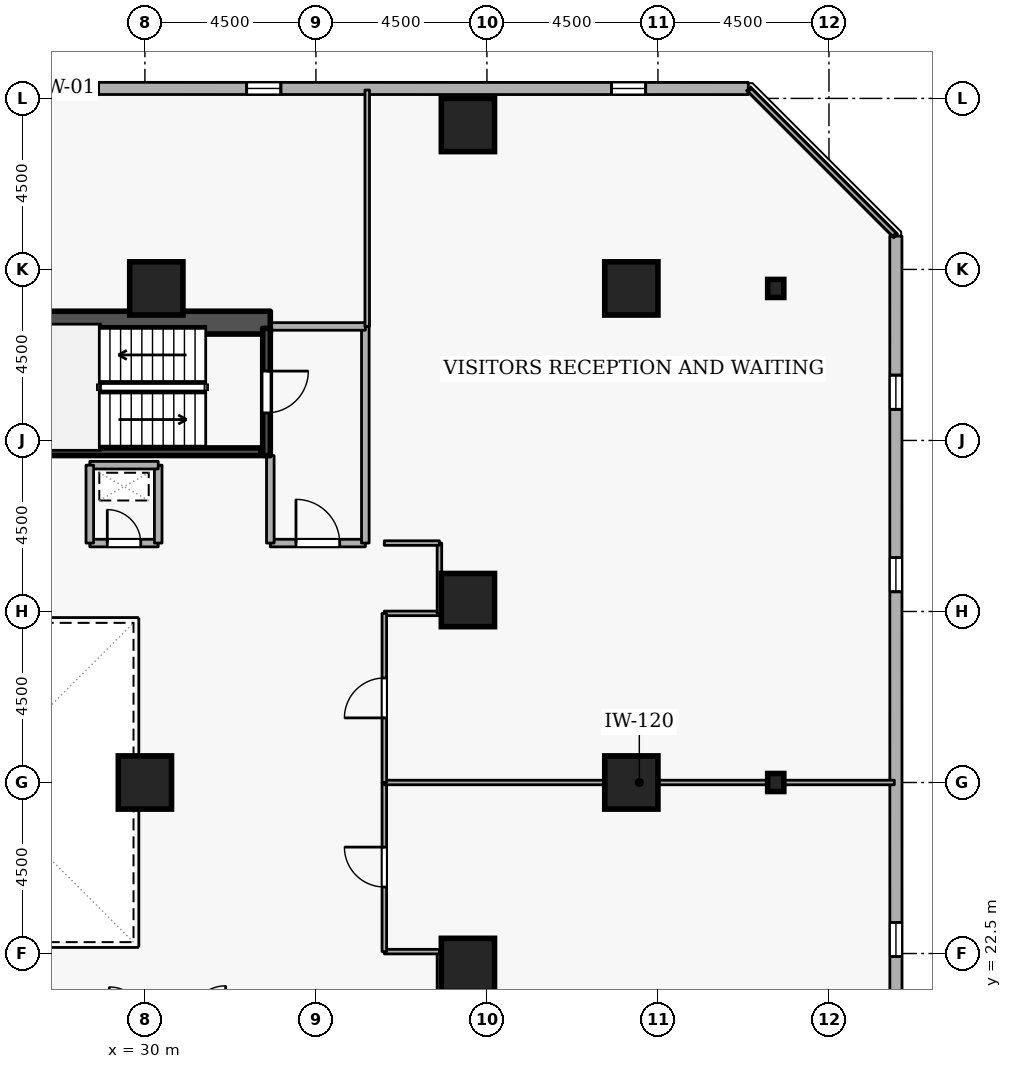
"""IFC4 building model, lengths in metres.
Left out: names, types, materials, properties, quantities, classifications, styles, units other than length and angle.
Written with IfcOpenShell. Run it as: python <this file> out.ifc"""

import sys

from ifc_helpers import new_model, si_unit, direction, frame, frame_2d, origin, origin_2d, place, context, subcontext, project, spatial, rectangle, i_section, extrude, element, fill, save


model = new_model("IFC4")
c1 = context("Model", 3, precision=1e-05, world=origin(), true_north=direction((0.0, 1.0)))
c2 = subcontext(c1, "Body", "Model", "MODEL_VIEW")
j1 = project(units=[si_unit("LENGTHUNIT", "METRE"), si_unit("PLANEANGLEUNIT", "RADIAN")], contexts=[c1])
p1 = place(None, origin())
s1 = spatial("IfcSite", under=j1, at=p1, CompositionType="ELEMENT")
p2 = place(p1, origin())
s2 = spatial("IfcBuilding", under=s1, at=p2, CompositionType="ELEMENT")
p3 = place(p2, frame((0.0, 0.0, 53.7)))
s3 = spatial("IfcBuildingStorey", under=s2, at=p3, CompositionType="ELEMENT", Elevation=53.7)
p4 = place(p3, frame((17.7, 39.1, 0.0), z_axis=(0.0, 0.0, 1.0), x_axis=(1.0, 0.0, 0.0)))
e1 = element("IfcWall", 1, at=p4, inside=s3, PredefinedType="SHEAR", context=c2, shape_type="SweptSolid", body=[
    extrude(rectangle(XDim=15.6, YDim=0.6, at=frame_2d((7.8, 0.0))), origin(), (0.0, 0.0, 1.0), 3.6),
])
for number, where, z_axis, x_axis in (
    (2, (42.8, 27.0, 0.0), (0.0, 0.0, 1.0), (1.0, 0.0, 0.0)),
    (3, (42.8, 40.0, 0.0), (0.0, 0.0, 1.0), (1.0, 0.0, 0.0)),
    (4, (38.5, 44.3, 0.0), (0.0, 0.0, 1.0), (1.0, 0.0, 0.0)),
    (5, (38.5, 22.2, 0.0), (0.0, 0.0, 1.0), (1.0, 0.0, 0.0)),
    (6, (38.5, 31.8, 0.0), (0.0, 0.0, 1.0), (1.0, 0.0, 0.0)),
    (7, (30.3, 40.0, 0.0), (0.0, 0.0, 1.0), (1.0, 0.0, 0.0)),
    (8, (30.0, 27.0, 0.0), (0.0, 0.0, 1.0), (1.0, 0.0, 0.0)),
):
    element("IfcColumn", number, at=place(p3, frame(where, z_axis=z_axis, x_axis=x_axis)), inside=s3, PredefinedType="COLUMN", context=c2, shape_type="SweptSolid", body=[
        extrude(rectangle(XDim=1.4, YDim=1.4, at=origin_2d()), origin(), (0.0, 0.0, 1.0), 3.6),
    ])
for number, where, z_axis, x_axis in (
    (9, (46.6, 27.0, 0.0), (0.0, 0.0, 1.0), (1.0, 0.0, 0.0)),
    (10, (46.6, 40.0, 0.0), (0.0, 0.0, 1.0), (1.0, 0.0, 0.0)),
):
    element("IfcColumn", number, at=place(p3, frame(where, z_axis=z_axis, x_axis=x_axis)), inside=s3, PredefinedType="COLUMN", context=c2, shape_type="SweptSolid", body=[
        extrude(i_section(OverallWidth=0.424, OverallDepth=0.475, WebThickness=0.048, FlangeThickness=0.077, FilletRadius=0.015, at=origin_2d()), origin(), (0.0, 0.0, 1.0), 3.6),
    ])
p5 = place(p3, frame((49.765, 5.319, 0.0), z_axis=(0.0, 0.0, 1.0), x_axis=(-0.000121872777, 0.999999992574, 0.0)))
e11 = element("IfcWall", 11, at=p5, inside=s3, PredefinedType="STANDARD", context=c2, shape_type="SweptSolid", body=[
    extrude(rectangle(XDim=36.058, YDim=0.32, at=frame_2d((18.029, 0.0))), origin(), (0.0, 0.0, 1.0), 2.7),
])
p6 = place(p5, frame((2.7, 0.0, 0.72)))
e12 = element("IfcOpeningElement", 12, at=p6, cuts=e11, PredefinedType="OPENING", context=c2, shape_type="SweptSolid", body=[
    extrude(rectangle(XDim=0.9, YDim=1.75, at=frame_2d((0.45, 0.875))), frame((0.0, 0.17, 0.0), z_axis=(0.0, -1.0, 0.0), x_axis=(1.0, 0.0, 0.0)), (0.0, 0.0, 1.0), 0.34),
])
p7 = place(p5, frame((12.3, 0.0, 0.72)))
e13 = element("IfcOpeningElement", 13, at=p7, cuts=e11, PredefinedType="OPENING", context=c2, shape_type="SweptSolid", body=[
    extrude(rectangle(XDim=0.9, YDim=1.75, at=frame_2d((0.45, 0.875))), frame((0.0, 0.17, 0.0), z_axis=(0.0, -1.0, 0.0), x_axis=(1.0, 0.0, 0.0)), (0.0, 0.0, 1.0), 0.34),
])
p8 = place(p5, frame((17.1, 0.0, 0.72)))
e14 = element("IfcOpeningElement", 14, at=p8, cuts=e11, PredefinedType="OPENING", context=c2, shape_type="SweptSolid", body=[
    extrude(rectangle(XDim=0.9, YDim=1.75, at=frame_2d((0.45, 0.875))), frame((0.0, 0.17, 0.0), z_axis=(0.0, -1.0, 0.0), x_axis=(1.0, 0.0, 0.0)), (0.0, 0.0, 1.0), 0.34),
])
p9 = place(p5, frame((26.7, 0.0, 0.72)))
e15 = element("IfcOpeningElement", 15, at=p9, cuts=e11, PredefinedType="OPENING", context=c2, shape_type="SweptSolid", body=[
    extrude(rectangle(XDim=0.9, YDim=1.75, at=frame_2d((0.45, 0.875))), frame((0.0, 0.17, 0.0), z_axis=(0.0, -1.0, 0.0), x_axis=(1.0, 0.0, 0.0)), (0.0, 0.0, 1.0), 0.34),
])
p10 = place(p5, frame((31.5, 0.0, 0.72)))
e16 = element("IfcOpeningElement", 16, at=p10, cuts=e11, PredefinedType="OPENING", context=c2, shape_type="SweptSolid", body=[
    extrude(rectangle(XDim=0.9, YDim=1.75, at=frame_2d((0.45, 0.875))), frame((0.0, 0.17, 0.0), z_axis=(0.0, -1.0, 0.0), x_axis=(1.0, 0.0, 0.0)), (0.0, 0.0, 1.0), 0.34),
])
p11 = place(p3, frame((45.877, 45.26, 0.0), z_axis=(0.0, 0.0, 1.0), x_axis=(-0.999999992574, 0.000121872777, 0.0)))
e17 = element("IfcWall", 17, at=p11, inside=s3, PredefinedType="STANDARD", context=c2, shape_type="SweptSolid", body=[
    extrude(rectangle(XDim=36.058, YDim=0.32, at=frame_2d((18.029, 0.0))), origin(), (0.0, 0.0, 1.0), 2.7),
])
p12 = place(p11, frame((2.7, 0.0, 0.72)))
e18 = element("IfcOpeningElement", 18, at=p12, cuts=e17, PredefinedType="OPENING", context=c2, shape_type="SweptSolid", body=[
    extrude(rectangle(XDim=0.9, YDim=1.75, at=frame_2d((0.45, 0.875))), frame((0.0, 0.17, 0.0), z_axis=(0.0, -1.0, 0.0), x_axis=(1.0, 0.0, 0.0)), (0.0, 0.0, 1.0), 0.34),
])
p13 = place(p11, frame((12.3, 0.0, 0.72)))
e19 = element("IfcOpeningElement", 19, at=p13, cuts=e17, PredefinedType="OPENING", context=c2, shape_type="SweptSolid", body=[
    extrude(rectangle(XDim=0.9, YDim=1.75, at=frame_2d((0.45, 0.875))), frame((0.0, 0.17, 0.0), z_axis=(0.0, -1.0, 0.0), x_axis=(1.0, 0.0, 0.0)), (0.0, 0.0, 1.0), 0.34),
])
p14 = place(p11, frame((17.1, 0.0, 0.72)))
e20 = element("IfcOpeningElement", 20, at=p14, cuts=e17, PredefinedType="OPENING", context=c2, shape_type="SweptSolid", body=[
    extrude(rectangle(XDim=0.9, YDim=1.75, at=frame_2d((0.45, 0.875))), frame((0.0, 0.17, 0.0), z_axis=(0.0, -1.0, 0.0), x_axis=(1.0, 0.0, 0.0)), (0.0, 0.0, 1.0), 0.34),
])
p15 = place(p11, frame((21.9, 0.0, 0.72)))
e21 = element("IfcOpeningElement", 21, at=p15, cuts=e17, PredefinedType="OPENING", context=c2, shape_type="SweptSolid", body=[
    extrude(rectangle(XDim=0.9, YDim=1.75, at=frame_2d((0.45, 0.875))), frame((0.0, 0.17, 0.0), z_axis=(0.0, -1.0, 0.0), x_axis=(1.0, 0.0, 0.0)), (0.0, 0.0, 1.0), 0.34),
])
p16 = place(p11, frame((26.7, 0.0, 0.72)))
e22 = element("IfcOpeningElement", 22, at=p16, cuts=e17, PredefinedType="OPENING", context=c2, shape_type="SweptSolid", body=[
    extrude(rectangle(XDim=0.9, YDim=1.75, at=frame_2d((0.45, 0.875))), frame((0.0, 0.17, 0.0), z_axis=(0.0, -1.0, 0.0), x_axis=(1.0, 0.0, 0.0)), (0.0, 0.0, 1.0), 0.34),
])
p17 = place(p3, frame((33.2, 38.95, 0.0), z_axis=(0.0, 0.0, 1.0), x_axis=(0.0, -1.0, 0.0)))
e23 = element("IfcWall", 23, at=p17, inside=s3, PredefinedType="SHEAR", context=c2, shape_type="SweptSolid", body=[
    extrude(rectangle(XDim=3.35, YDim=0.2, at=frame_2d((1.675, 0.0))), origin(), (0.0, 0.0, 1.0), 3.6),
])
p18 = place(p17, frame((1.125, 0.0, 0.0)))
e24 = element("IfcOpeningElement", 24, at=p18, cuts=e23, PredefinedType="OPENING", context=c2, shape_type="SweptSolid", body=[
    extrude(rectangle(XDim=1.1, YDim=2.1, at=frame_2d((0.55, 1.05))), frame((0.0, 0.11, 0.0), z_axis=(0.0, -1.0, 0.0), x_axis=(1.0, 0.0, 0.0)), (0.0, 0.0, 1.0), 0.22),
])
p19 = place(p3, frame((25.95, 35.703, 0.0), z_axis=(0.0, 0.0, 1.0), x_axis=(1.0, 0.0, 0.0)))
e25 = element("IfcWall", 25, at=p19, inside=s3, PredefinedType="SHEAR", context=c2, shape_type="SweptSolid", body=[
    extrude(rectangle(XDim=7.1, YDim=0.2, at=frame_2d((3.55, 0.0))), origin(), (0.0, 0.0, 1.0), 3.6),
])
p20 = place(p3, frame((33.3, 33.3, 0.0), z_axis=(0.0, 0.0, 1.0), x_axis=(1.0, 0.0, 0.0)))
e26 = element("IfcWall", 26, at=p20, inside=s3, PredefinedType="STANDARD", context=c2, shape_type="SweptSolid", body=[
    extrude(rectangle(XDim=2.5, YDim=0.2, at=frame_2d((1.25, 0.0))), origin(), (0.0, 0.0, 1.0), 3.34),
])
p21 = place(p20, frame((0.675, 0.0, 0.0)))
e27 = element("IfcOpeningElement", 27, at=p21, cuts=e26, PredefinedType="OPENING", context=c2, shape_type="SweptSolid", body=[
    extrude(rectangle(XDim=1.15, YDim=2.1, at=frame_2d((0.575, 1.05))), frame((0.0, 0.11, 0.0), z_axis=(0.0, -1.0, 0.0), x_axis=(1.0, 0.0, 0.0)), (0.0, 0.0, 1.0), 0.22),
])
p22 = place(p3, frame((35.8, 33.3, 0.0), z_axis=(0.0, 0.0, 1.0), x_axis=(0.0, 1.0, 0.0)))
e28 = element("IfcWall", 28, at=p22, inside=s3, PredefinedType="STANDARD", context=c2, shape_type="SweptSolid", body=[
    extrude(rectangle(XDim=5.7, YDim=0.2, at=frame_2d((2.85, 0.0))), origin(), (0.0, 0.0, 1.0), 3.34),
])
p23 = place(p3, frame((35.8, 39.0, 0.0), z_axis=(0.0, 0.0, 1.0), x_axis=(-1.0, 0.0, 0.0)))
e29 = element("IfcWall", 29, at=p23, inside=s3, PredefinedType="STANDARD", context=c2, shape_type="SweptSolid", body=[
    extrude(rectangle(XDim=2.5, YDim=0.2, at=frame_2d((1.25, 0.0))), origin(), (0.0, 0.0, 1.0), 3.34),
])
p24 = place(p3, frame((33.3, 35.6, 0.0), z_axis=(0.0, 0.0, 1.0), x_axis=(0.0, -1.0, 0.0)))
e30 = element("IfcWall", 30, at=p24, inside=s3, PredefinedType="STANDARD", context=c2, shape_type="SweptSolid", body=[
    extrude(rectangle(XDim=2.3, YDim=0.2, at=frame_2d((1.15, 0.0))), origin(), (0.0, 0.0, 1.0), 2.545),
])
p25 = place(p3, frame((28.55, 33.3, 0.0), z_axis=(0.0, 0.0, 1.0), x_axis=(1.0, 0.0, 0.0)))
e31 = element("IfcWall", 31, at=p25, inside=s3, PredefinedType="STANDARD", context=c2, shape_type="SweptSolid", body=[
    extrude(rectangle(XDim=1.8, YDim=0.2, at=frame_2d((0.9, 0.0))), origin(), (0.0, 0.0, 1.0), 3.34),
])
p26 = place(p25, frame((0.46, 0.0, 0.0)))
e32 = element("IfcOpeningElement", 32, at=p26, cuts=e31, PredefinedType="OPENING", context=c2, shape_type="SweptSolid", body=[
    extrude(rectangle(XDim=0.88, YDim=2.04, at=frame_2d((0.44, 1.02))), frame((0.0, 0.11, 0.0), z_axis=(0.0, -1.0, 0.0), x_axis=(1.0, 0.0, 0.0)), (0.0, 0.0, 1.0), 0.22),
])
p27 = place(p3, frame((30.35, 33.3, 0.0), z_axis=(0.0, 0.0, 1.0), x_axis=(0.0, 1.0, 0.0)))
e33 = element("IfcWall", 33, at=p27, inside=s3, PredefinedType="STANDARD", context=c2, shape_type="SweptSolid", body=[
    extrude(rectangle(XDim=2.05, YDim=0.2, at=frame_2d((1.025, 0.0))), origin(), (0.0, 0.0, 1.0), 3.34),
])
p28 = place(p3, frame((30.35, 35.35, 0.0), z_axis=(0.0, 0.0, 1.0), x_axis=(-1.0, 0.0, 0.0)))
e34 = element("IfcWall", 34, at=p28, inside=s3, PredefinedType="STANDARD", context=c2, shape_type="SweptSolid", body=[
    extrude(rectangle(XDim=1.8, YDim=0.2, at=frame_2d((0.9, 0.0))), origin(), (0.0, 0.0, 1.0), 3.34),
])
p29 = place(p3, frame((28.55, 35.35, 0.0), z_axis=(0.0, 0.0, 1.0), x_axis=(0.0, -1.0, 0.0)))
e35 = element("IfcWall", 35, at=p29, inside=s3, PredefinedType="STANDARD", context=c2, shape_type="SweptSolid", body=[
    extrude(rectangle(XDim=2.05, YDim=0.2, at=frame_2d((1.025, 0.0))), origin(), (0.0, 0.0, 1.0), 3.34),
])
p30 = place(p3, frame((37.75, 20.7, 0.0), z_axis=(0.0, 0.0, 1.0), x_axis=(0.0, 1.0, 0.0)))
e36 = element("IfcWall", 36, at=p30, inside=s3, PredefinedType="PARTITIONING", context=c2, shape_type="SweptSolid", body=[
    extrude(rectangle(XDim=1.85, YDim=0.12, at=frame_2d((0.925, 0.0))), origin(), (0.0, 0.0, 1.0), 3.34),
])
p31 = place(p3, frame((37.75, 22.55, 0.0), z_axis=(0.0, 0.0, 1.0), x_axis=(-1.0, 0.0, 0.0)))
e37 = element("IfcWall", 37, at=p31, inside=s3, PredefinedType="PARTITIONING", context=c2, shape_type="SweptSolid", body=[
    extrude(rectangle(XDim=1.45, YDim=0.12, at=frame_2d((0.725, 0.0))), origin(), (0.0, 0.0, 1.0), 3.34),
])
p32 = place(p3, frame((36.3, 22.55, 0.0), z_axis=(0.0, 0.0, 1.0), x_axis=(0.0, 1.0, 0.0)))
e38 = element("IfcWall", 38, at=p32, inside=s3, PredefinedType="PARTITIONING", context=c2, shape_type="SweptSolid", body=[
    extrude(rectangle(XDim=4.45, YDim=0.12, at=frame_2d((2.225, 0.0))), origin(), (0.0, 0.0, 1.0), 3.34),
])
p33 = place(p32, frame((1.7, 0.0, 0.0)))
e39 = element("IfcOpeningElement", 39, at=p33, cuts=e38, PredefinedType="OPENING", context=c2, shape_type="SweptSolid", body=[
    extrude(rectangle(XDim=1.05, YDim=2.1, at=frame_2d((0.525, 1.05))), frame((0.0, 0.07, 0.0), z_axis=(0.0, -1.0, 0.0), x_axis=(1.0, 0.0, 0.0)), (0.0, 0.0, 1.0), 0.14),
])
p34 = place(p3, frame((36.3, 27.0, 0.0), z_axis=(0.0, 0.0, 1.0), x_axis=(1.0, 0.0, 0.0)))
e40 = element("IfcWall", 40, at=p34, inside=s3, PredefinedType="PARTITIONING", context=c2, shape_type="SweptSolid", body=[
    extrude(rectangle(XDim=13.42, YDim=0.12, at=frame_2d((6.71, 0.0))), origin(), (0.0, 0.0, 1.0), 2.932),
])
p35 = place(p3, frame((36.3, 31.45, 0.0), z_axis=(0.0, 0.0, 1.0), x_axis=(1.0, 0.0, 0.0)))
e41 = element("IfcWall", 41, at=p35, inside=s3, PredefinedType="PARTITIONING", context=c2, shape_type="SweptSolid", body=[
    extrude(rectangle(XDim=1.45, YDim=0.12, at=frame_2d((0.725, 0.0))), origin(), (0.0, 0.0, 1.0), 3.34),
])
p36 = place(p3, frame((37.75, 31.45, 0.0), z_axis=(0.0, 0.0, 1.0), x_axis=(0.0, 1.0, 0.0)))
e42 = element("IfcWall", 42, at=p36, inside=s3, PredefinedType="PARTITIONING", context=c2, shape_type="SweptSolid", body=[
    extrude(rectangle(XDim=1.85, YDim=0.12, at=frame_2d((0.925, 0.0))), origin(), (0.0, 0.0, 1.0), 3.34),
])
p37 = place(p3, frame((37.75, 33.3, 0.0), z_axis=(0.0, 0.0, 1.0), x_axis=(-1.0, 0.0, 0.0)))
e43 = element("IfcWall", 43, at=p37, inside=s3, PredefinedType="PARTITIONING", context=c2, shape_type="SweptSolid", body=[
    extrude(rectangle(XDim=1.45, YDim=0.12, at=frame_2d((0.725, 0.0))), origin(), (0.0, 0.0, 1.0), 3.34),
])
p38 = place(p3, frame((35.85, 39.0, 0.0), z_axis=(0.0, 0.0, 1.0), x_axis=(0.0, 1.0, 0.0)))
e44 = element("IfcWall", 44, at=p38, inside=s3, PredefinedType="PARTITIONING", context=c2, shape_type="SweptSolid", body=[
    extrude(rectangle(XDim=6.22, YDim=0.12, at=frame_2d((3.11, 0.0))), origin(), (0.0, 0.0, 1.0), 3.34),
])
p39 = place(p3, frame((45.917, 45.22, 0.0), z_axis=(0.0, 0.0, 1.0), x_axis=(0.707106781187, -0.707106781187, 0.0)))
e45 = element("IfcWall", 45, at=p39, inside=s3, PredefinedType="PARTITIONING", context=c2, shape_type="SweptSolid", body=[
    extrude(rectangle(XDim=5.379, YDim=0.12, at=frame_2d((2.689, 0.0))), origin(), (0.0, 0.0, 1.0), 3.34),
])
p40 = place(p3, frame((36.3, 27.0, 0.0), z_axis=(0.0, 0.0, 1.0), x_axis=(0.0, 1.0, 0.0)))
e46 = element("IfcWall", 46, at=p40, inside=s3, PredefinedType="PARTITIONING", context=c2, shape_type="SweptSolid", body=[
    extrude(rectangle(XDim=4.45, YDim=0.12, at=frame_2d((2.225, 0.0))), origin(), (0.0, 0.0, 1.0), 3.34),
])
p41 = place(p40, frame((1.7, 0.0, 0.0)))
e47 = element("IfcOpeningElement", 47, at=p41, cuts=e46, PredefinedType="OPENING", context=c2, shape_type="SweptSolid", body=[
    extrude(rectangle(XDim=1.05, YDim=2.1, at=frame_2d((0.525, 1.05))), frame((0.0, 0.07, 0.0), z_axis=(0.0, -1.0, 0.0), x_axis=(1.0, 0.0, 0.0)), (0.0, 0.0, 1.0), 0.14),
])
p42 = place(p8, origin())
e48 = element("IfcWindow", 48, at=p42, inside=s3, PartitioningType="SINGLE_PANEL", PredefinedType="WINDOW", context=c2, shape_type="SweptSolid", body=[
    extrude(rectangle(XDim=0.9, YDim=1.75, at=frame_2d((0.45, 0.875))), frame((0.0, 0.03, 0.0), z_axis=(0.0, -1.0, 0.0), x_axis=(1.0, 0.0, 0.0)), (0.0, 0.0, 1.0), 0.06),
])
fill(e14, e48)
p43 = place(p9, origin())
e49 = element("IfcWindow", 49, at=p43, inside=s3, PartitioningType="SINGLE_PANEL", PredefinedType="WINDOW", context=c2, shape_type="SweptSolid", body=[
    extrude(rectangle(XDim=0.9, YDim=1.75, at=frame_2d((0.45, 0.875))), frame((0.0, 0.03, 0.0), z_axis=(0.0, -1.0, 0.0), x_axis=(1.0, 0.0, 0.0)), (0.0, 0.0, 1.0), 0.06),
])
fill(e15, e49)
p44 = place(p10, origin())
e50 = element("IfcWindow", 50, at=p44, inside=s3, PartitioningType="SINGLE_PANEL", PredefinedType="WINDOW", context=c2, shape_type="SweptSolid", body=[
    extrude(rectangle(XDim=0.9, YDim=1.75, at=frame_2d((0.45, 0.875))), frame((0.0, 0.03, 0.0), z_axis=(0.0, -1.0, 0.0), x_axis=(1.0, 0.0, 0.0)), (0.0, 0.0, 1.0), 0.06),
])
fill(e16, e50)
p45 = place(p12, origin())
e51 = element("IfcWindow", 51, at=p45, inside=s3, PartitioningType="SINGLE_PANEL", PredefinedType="WINDOW", context=c2, shape_type="SweptSolid", body=[
    extrude(rectangle(XDim=0.9, YDim=1.75, at=frame_2d((0.45, 0.875))), frame((0.0, 0.03, 0.0), z_axis=(0.0, -1.0, 0.0), x_axis=(1.0, 0.0, 0.0)), (0.0, 0.0, 1.0), 0.06),
])
fill(e18, e51)
p46 = place(p13, origin())
e52 = element("IfcWindow", 52, at=p46, inside=s3, PartitioningType="SINGLE_PANEL", PredefinedType="WINDOW", context=c2, shape_type="SweptSolid", body=[
    extrude(rectangle(XDim=0.9, YDim=1.75, at=frame_2d((0.45, 0.875))), frame((0.0, 0.03, 0.0), z_axis=(0.0, -1.0, 0.0), x_axis=(1.0, 0.0, 0.0)), (0.0, 0.0, 1.0), 0.06),
])
fill(e19, e52)
p47 = place(p14, origin())
e53 = element("IfcWindow", 53, at=p47, inside=s3, PartitioningType="SINGLE_PANEL", PredefinedType="WINDOW", context=c2, shape_type="SweptSolid", body=[
    extrude(rectangle(XDim=0.9, YDim=1.75, at=frame_2d((0.45, 0.875))), frame((0.0, 0.03, 0.0), z_axis=(0.0, -1.0, 0.0), x_axis=(1.0, 0.0, 0.0)), (0.0, 0.0, 1.0), 0.06),
])
fill(e20, e53)
p48 = place(p18, origin())
e54 = element("IfcDoor", 54, at=p48, inside=s3, OperationType="SINGLE_SWING_LEFT", PredefinedType="DOOR", context=c2, shape_type="SweptSolid", body=[
    extrude(rectangle(XDim=1.1, YDim=2.1, at=frame_2d((0.55, 1.05))), frame((0.0, 0.025, 0.0), z_axis=(0.0, -1.0, 0.0), x_axis=(1.0, 0.0, 0.0)), (0.0, 0.0, 1.0), 0.05),
])
fill(e24, e54)
p49 = place(p21, origin())
e55 = element("IfcDoor", 55, at=p49, inside=s3, OperationType="SINGLE_SWING_LEFT", PredefinedType="DOOR", context=c2, shape_type="SweptSolid", body=[
    extrude(rectangle(XDim=1.15, YDim=2.1, at=frame_2d((0.575, 1.05))), frame((0.0, 0.025, 0.0), z_axis=(0.0, -1.0, 0.0), x_axis=(1.0, 0.0, 0.0)), (0.0, 0.0, 1.0), 0.05),
])
fill(e27, e55)
p50 = place(p26, origin())
e56 = element("IfcDoor", 56, at=p50, inside=s3, OperationType="SINGLE_SWING_LEFT", PredefinedType="DOOR", context=c2, shape_type="SweptSolid", body=[
    extrude(rectangle(XDim=0.88, YDim=2.04, at=frame_2d((0.44, 1.02))), frame((0.0, 0.025, 0.0), z_axis=(0.0, -1.0, 0.0), x_axis=(1.0, 0.0, 0.0)), (0.0, 0.0, 1.0), 0.05),
])
fill(e32, e56)
p51 = place(p33, origin())
e57 = element("IfcDoor", 57, at=p51, inside=s3, OperationType="SINGLE_SWING_RIGHT", PredefinedType="DOOR", context=c2, shape_type="SweptSolid", body=[
    extrude(rectangle(XDim=1.05, YDim=2.1, at=frame_2d((0.525, 1.05))), frame((0.0, 0.025, 0.0), z_axis=(0.0, -1.0, 0.0), x_axis=(1.0, 0.0, 0.0)), (0.0, 0.0, 1.0), 0.05),
])
fill(e39, e57)
p52 = place(p41, origin())
e58 = element("IfcDoor", 58, at=p52, inside=s3, OperationType="SINGLE_SWING_LEFT", PredefinedType="DOOR", context=c2, shape_type="SweptSolid", body=[
    extrude(rectangle(XDim=1.05, YDim=2.1, at=frame_2d((0.525, 1.05))), frame((0.0, 0.025, 0.0), z_axis=(0.0, -1.0, 0.0), x_axis=(1.0, 0.0, 0.0)), (0.0, 0.0, 1.0), 0.05),
])
fill(e47, e58)
save(model, sys.argv[1])
